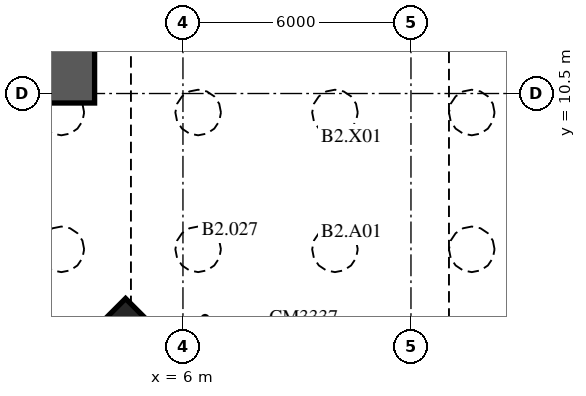
"""IFC4 building model, lengths in metres.
Left out: names, types, materials, properties, quantities, classifications, styles, units other than length and angle.
Written with IfcOpenShell. Run it as: python <this file> out.ifc"""

import sys

from ifc_helpers import new_model, si_unit, direction, frame, frame_2d, origin, origin_2d, place, context, subcontext, project, spatial, rectangle, extrude, element, save


model = new_model("IFC4")
c1 = context("Model", 3, precision=1e-05, world=origin(), true_north=direction((0.0, 1.0)))
c2 = subcontext(c1, "Body", "Model", "MODEL_VIEW")
j1 = project(units=[si_unit("LENGTHUNIT", "METRE"), si_unit("PLANEANGLEUNIT", "RADIAN")], contexts=[c1])
p1 = place(None, origin())
s1 = spatial("IfcSite", under=j1, at=p1, CompositionType="ELEMENT")
p2 = place(p1, origin())
s2 = spatial("IfcBuilding", under=s1, at=p2, CompositionType="ELEMENT")
p3 = place(p2, frame((0.0, 0.0, -7.5)))
s3 = spatial("IfcBuildingStorey", under=s2, at=p3, CompositionType="ELEMENT", Elevation=-7.5)
p4 = place(p3, frame((4.631, 2.631, -0.6), z_axis=(0.0, 0.0, 1.0), x_axis=(0.707106781187, 0.707106781187, 0.0)))
e1 = element("IfcColumn", 1, at=p4, inside=s3, PredefinedType="COLUMN", context=c2, shape_type="SweptSolid", body=[
    extrude(rectangle(XDim=3.3, YDim=3.7, at=origin_2d()), origin(), (0.0, 0.0, 1.0), 4.1),
])
p5 = place(p3, frame((2.95, 10.25, -0.6), z_axis=(0.0, 0.0, 1.0), x_axis=(0.0, 1.0, 0.0)))
e2 = element("IfcWall", 2, at=p5, inside=s3, PredefinedType="SHEAR", context=c2, shape_type="SweptSolid", body=[
    extrude(rectangle(XDim=5.5, YDim=1.45, at=frame_2d((2.75, 0.0))), origin(), (0.0, 0.0, 1.0), 4.1),
])
save(model, sys.argv[1])
